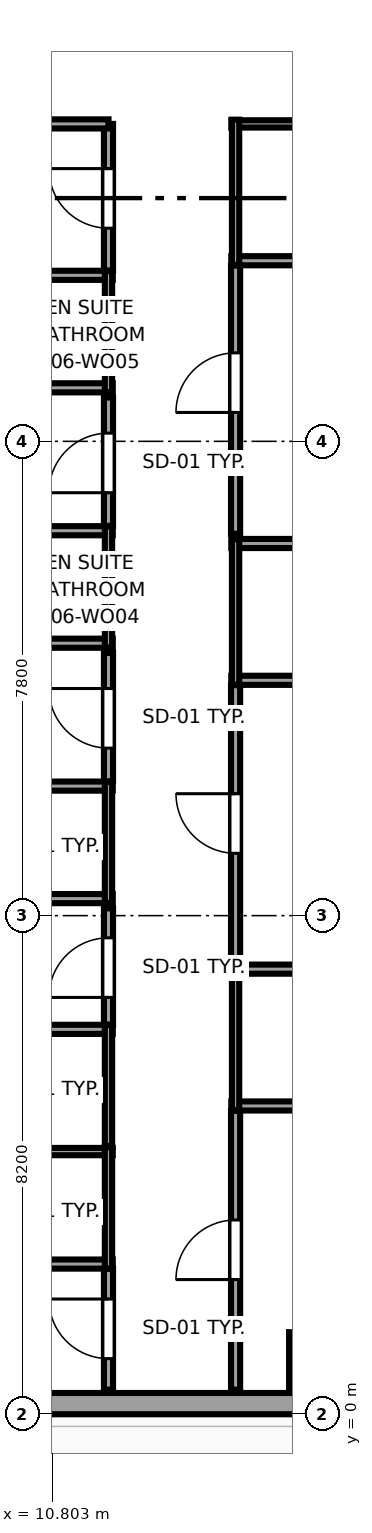
"""IFC4 building model, lengths in metres.
Left out: names, types, materials, properties, quantities, classifications, styles, units other than length and angle.
Written with IfcOpenShell. Run it as: python <this file> out.ifc"""

import sys

from ifc_helpers import new_model, si_unit, direction, frame, frame_2d, origin, origin_2d, place, context, subcontext, project, spatial, rectangle, extrude, source, transform, mapped, element, fill, save


model = new_model("IFC4")
c1 = context("Model", 3, precision=1e-05, world=origin(), true_north=direction((0.0, 1.0)))
c2 = subcontext(c1, "Body", "Model", "MODEL_VIEW")
j1 = project(units=[si_unit("LENGTHUNIT", "METRE"), si_unit("PLANEANGLEUNIT", "RADIAN")], contexts=[c1])
p1 = place(None, origin())
s1 = spatial("IfcSite", under=j1, at=p1, CompositionType="ELEMENT")
p2 = place(p1, origin())
s2 = spatial("IfcBuilding", under=s1, at=p2, CompositionType="ELEMENT")
p3 = place(p2, frame((0.0, 0.0, 32.0)))
s3 = spatial("IfcBuildingStorey", under=s2, at=p3, CompositionType="ELEMENT", Elevation=32.0)
m1 = source(origin(), c2, "Body", "SweptSolid", [
    extrude(rectangle(XDim=1.0, YDim=1.0, at=origin_2d()), origin(), (0.0, 0.0, 1.0), 3.55),
])
p4 = place(p3, frame((15.2, 0.85, 0.0), z_axis=(0.0, 0.0, 1.0), x_axis=(1.0, 0.0, 0.0)))
e1 = element("IfcColumn", 1, at=p4, inside=s3, PredefinedType="COLUMN", context=c2, shape_type="MappedRepresentation", body=[
    mapped(m1, transform((0.0, 0.0, 0.0), x_axis=(1.0, 0.0, 0.0), y_axis=(0.0, 1.0, 0.0), z_axis=(0.0, 0.0, 1.0), scale=1.0)),
])
p5 = place(p3, frame((4.617, 0.175, 0.0), z_axis=(0.0, 0.0, 1.0), x_axis=(1.0, 0.0, 0.0)))
e2 = element("IfcWall", 2, at=p5, inside=s3, PredefinedType="SOLIDWALL", context=c2, shape_type="SweptSolid", body=[
    extrude(rectangle(XDim=18.008, YDim=0.35, at=frame_2d((9.004, 0.0))), origin(), (0.0, 0.0, 1.0), 3.37),
])
p6 = place(p5, frame((14.257, 0.0, 0.68)))
e3 = element("IfcOpeningElement", 3, at=p6, cuts=e2, PredefinedType="OPENING", context=c2, shape_type="SweptSolid", body=[
    extrude(rectangle(XDim=2.1, YDim=1.9, at=frame_2d((1.05, 0.95))), frame((0.0, 0.185, 0.0), z_axis=(0.0, -1.0, 0.0), x_axis=(1.0, 0.0, 0.0)), (0.0, 0.0, 1.0), 0.37),
])
p7 = place(p5, frame((3.7, 0.0, 0.62)))
e4 = element("IfcOpeningElement", 4, at=p7, cuts=e2, PredefinedType="OPENING", context=c2, shape_type="SweptSolid", body=[
    extrude(rectangle(XDim=1.5, YDim=1.55, at=frame_2d((0.75, 0.775))), frame((0.0, 0.185, 0.0), z_axis=(0.0, -1.0, 0.0), x_axis=(1.0, 0.0, 0.0)), (0.0, 0.0, 1.0), 0.37),
])
p8 = place(p3, frame((9.21, 2.47, 0.0), z_axis=(0.0, 0.0, 1.0), x_axis=(1.0, 0.0, 0.0)))
e5 = element("IfcWall", 5, at=p8, inside=s3, PredefinedType="PARTITIONING", context=c2, shape_type="SweptSolid", body=[
    extrude(rectangle(XDim=2.59, YDim=0.15, at=frame_2d((1.295, 0.0))), origin(), (0.0, 0.0, 1.0), 3.37),
])
p9 = place(p3, frame((9.21, 4.32, 0.0), z_axis=(0.0, 0.0, 1.0), x_axis=(1.0, 0.0, 0.0)))
e6 = element("IfcWall", 6, at=p9, inside=s3, PredefinedType="PLUMBINGWALL", context=c2, shape_type="SweptSolid", body=[
    extrude(rectangle(XDim=2.59, YDim=0.12, at=frame_2d((1.295, 0.0))), origin(), (0.0, 0.0, 1.0), 3.37),
])
p10 = place(p3, frame((11.73, 2.4, 0.0), z_axis=(0.0, 0.0, 1.0), x_axis=(0.0, 1.0, 0.0)))
e7 = element("IfcWall", 7, at=p10, inside=s3, PredefinedType="PLUMBINGWALL", context=c2, shape_type="SweptSolid", body=[
    extrude(rectangle(XDim=1.99, YDim=0.12, at=frame_2d((0.995, 0.0))), origin(), (0.0, 0.0, 1.0), 3.37),
])
p11 = place(p3, frame((9.21, 6.33, 0.0), z_axis=(0.0, 0.0, 1.0), x_axis=(1.0, 0.0, 0.0)))
e8 = element("IfcWall", 8, at=p11, inside=s3, PredefinedType="PARTITIONING", context=c2, shape_type="SweptSolid", body=[
    extrude(rectangle(XDim=2.59, YDim=0.15, at=frame_2d((1.295, 0.0))), origin(), (0.0, 0.0, 1.0), 3.37),
])
p12 = place(p3, frame((11.73, 4.41, 0.0), z_axis=(0.0, 0.0, 1.0), x_axis=(0.0, 1.0, 0.0)))
e9 = element("IfcWall", 9, at=p12, inside=s3, PredefinedType="PLUMBINGWALL", context=c2, shape_type="SweptSolid", body=[
    extrude(rectangle(XDim=1.99, YDim=0.12, at=frame_2d((0.995, 0.0))), origin(), (0.0, 0.0, 1.0), 3.37),
])
p13 = place(p3, frame((0.405, 8.48, 0.0), z_axis=(0.0, 0.0, 1.0), x_axis=(1.0, 0.0, 0.0)))
e10 = element("IfcWall", 10, at=p13, inside=s3, PredefinedType="PARTITIONING", context=c2, shape_type="SweptSolid", body=[
    extrude(rectangle(XDim=11.395, YDim=0.15, at=frame_2d((5.698, 0.0))), origin(), (0.0, 0.0, 1.0), 3.37),
])
p14 = place(p3, frame((9.21, 10.33, 0.0), z_axis=(0.0, 0.0, 1.0), x_axis=(1.0, 0.0, 0.0)))
e11 = element("IfcWall", 11, at=p14, inside=s3, PredefinedType="PARTITIONING", context=c2, shape_type="SweptSolid", body=[
    extrude(rectangle(XDim=2.59, YDim=0.15, at=frame_2d((1.295, 0.0))), origin(), (0.0, 0.0, 1.0), 3.37),
])
p15 = place(p3, frame((11.73, 8.41, 0.0), z_axis=(0.0, 0.0, 1.0), x_axis=(0.0, 1.0, 0.0)))
e12 = element("IfcWall", 12, at=p15, inside=s3, PredefinedType="PLUMBINGWALL", context=c2, shape_type="SweptSolid", body=[
    extrude(rectangle(XDim=1.99, YDim=0.12, at=frame_2d((0.995, 0.0))), origin(), (0.0, 0.0, 1.0), 3.37),
])
p16 = place(p3, frame((0.405, 12.68, 0.0), z_axis=(0.0, 0.0, 1.0), x_axis=(1.0, 0.0, 0.0)))
e13 = element("IfcWall", 13, at=p16, inside=s3, PredefinedType="PARTITIONING", context=c2, shape_type="SweptSolid", body=[
    extrude(rectangle(XDim=11.395, YDim=0.15, at=frame_2d((5.698, 0.0))), origin(), (0.0, 0.0, 1.0), 3.37),
])
p17 = place(p3, frame((9.21, 14.53, 0.0), z_axis=(0.0, 0.0, 1.0), x_axis=(1.0, 0.0, 0.0)))
e14 = element("IfcWall", 14, at=p17, inside=s3, PredefinedType="PARTITIONING", context=c2, shape_type="SweptSolid", body=[
    extrude(rectangle(XDim=2.59, YDim=0.15, at=frame_2d((1.295, 0.0))), origin(), (0.0, 0.0, 1.0), 3.37),
])
p18 = place(p3, frame((11.73, 12.61, 0.0), z_axis=(0.0, 0.0, 1.0), x_axis=(0.0, 1.0, 0.0)))
e15 = element("IfcWall", 15, at=p18, inside=s3, PredefinedType="PLUMBINGWALL", context=c2, shape_type="SweptSolid", body=[
    extrude(rectangle(XDim=1.99, YDim=0.12, at=frame_2d((0.995, 0.0))), origin(), (0.0, 0.0, 1.0), 3.37),
])
p19 = place(p3, frame((0.405, 16.88, 0.0), z_axis=(0.0, 0.0, 1.0), x_axis=(1.0, 0.0, 0.0)))
e16 = element("IfcWall", 16, at=p19, inside=s3, PredefinedType="PARTITIONING", context=c2, shape_type="SweptSolid", body=[
    extrude(rectangle(XDim=11.395, YDim=0.15, at=frame_2d((5.698, 0.0))), origin(), (0.0, 0.0, 1.0), 3.37),
])
p20 = place(p3, frame((9.21, 18.73, 0.0), z_axis=(0.0, 0.0, 1.0), x_axis=(1.0, 0.0, 0.0)))
e17 = element("IfcWall", 17, at=p20, inside=s3, PredefinedType="PARTITIONING", context=c2, shape_type="SweptSolid", body=[
    extrude(rectangle(XDim=2.59, YDim=0.15, at=frame_2d((1.295, 0.0))), origin(), (0.0, 0.0, 1.0), 3.37),
])
p21 = place(p3, frame((11.73, 16.81, 0.0), z_axis=(0.0, 0.0, 1.0), x_axis=(0.0, 1.0, 0.0)))
e18 = element("IfcWall", 18, at=p21, inside=s3, PredefinedType="PLUMBINGWALL", context=c2, shape_type="SweptSolid", body=[
    extrude(rectangle(XDim=1.99, YDim=0.12, at=frame_2d((0.995, 0.0))), origin(), (0.0, 0.0, 1.0), 3.37),
])
for number, where, z_axis, x_axis in (
    (19, (13.75, 5.07, 0.0), (0.0, 0.0, 1.0), (1.0, 0.0, 0.0)),
    (20, (13.75, 7.32, 0.0), (0.0, 0.0, 1.0), (1.0, 0.0, 0.0)),
):
    element("IfcWall", number, at=place(p3, frame(where, z_axis=z_axis, x_axis=x_axis)), inside=s3, PredefinedType="PARTITIONING", context=c2, shape_type="SweptSolid", body=[
        extrude(rectangle(XDim=2.59, YDim=0.15, at=frame_2d((1.295, 0.0))), origin(), (0.0, 0.0, 1.0), 3.37),
    ])
p22 = place(p3, frame((13.82, 5.0, 0.0), z_axis=(0.0, 0.0, 1.0), x_axis=(0.0, 1.0, 0.0)))
e21 = element("IfcWall", 21, at=p22, inside=s3, PredefinedType="PLUMBINGWALL", context=c2, shape_type="SweptSolid", body=[
    extrude(rectangle(XDim=2.39, YDim=0.12, at=frame_2d((1.195, 0.0))), origin(), (0.0, 0.0, 1.0), 3.37),
])
for number, where, z_axis, x_axis in (
    (22, (13.75, 12.07, 0.0), (0.0, 0.0, 1.0), (1.0, 0.0, 0.0)),
    (23, (13.75, 14.32, 0.0), (0.0, 0.0, 1.0), (1.0, 0.0, 0.0)),
):
    element("IfcWall", number, at=place(p3, frame(where, z_axis=z_axis, x_axis=x_axis)), inside=s3, PredefinedType="PARTITIONING", context=c2, shape_type="SweptSolid", body=[
        extrude(rectangle(XDim=2.59, YDim=0.15, at=frame_2d((1.295, 0.0))), origin(), (0.0, 0.0, 1.0), 3.37),
    ])
p23 = place(p3, frame((13.82, 12.0, 0.0), z_axis=(0.0, 0.0, 1.0), x_axis=(0.0, 1.0, 0.0)))
e24 = element("IfcWall", 24, at=p23, inside=s3, PredefinedType="PLUMBINGWALL", context=c2, shape_type="SweptSolid", body=[
    extrude(rectangle(XDim=2.39, YDim=0.12, at=frame_2d((1.195, 0.0))), origin(), (0.0, 0.0, 1.0), 3.37),
])
p24 = place(p3, frame((13.75, 18.97, 0.0), z_axis=(0.0, 0.0, 1.0), x_axis=(1.0, 0.0, 0.0)))
e25 = element("IfcWall", 25, at=p24, inside=s3, PredefinedType="PARTITIONING", context=c2, shape_type="SweptSolid", body=[
    extrude(rectangle(XDim=2.59, YDim=0.15, at=frame_2d((1.295, 0.0))), origin(), (0.0, 0.0, 1.0), 3.37),
])
p25 = place(p3, frame((13.75, 21.22, 0.0), z_axis=(0.0, 0.0, 1.0), x_axis=(1.0, 0.0, 0.0)))
e26 = element("IfcWall", 26, at=p25, inside=s3, PredefinedType="PLUMBINGWALL", context=c2, shape_type="SweptSolid", body=[
    extrude(rectangle(XDim=2.59, YDim=0.12, at=frame_2d((1.295, 0.0))), origin(), (0.0, 0.0, 1.0), 3.37),
])
p26 = place(p3, frame((13.82, 18.9, 0.0), z_axis=(0.0, 0.0, 1.0), x_axis=(0.0, 1.0, 0.0)))
e27 = element("IfcWall", 27, at=p26, inside=s3, PredefinedType="PLUMBINGWALL", context=c2, shape_type="SweptSolid", body=[
    extrude(rectangle(XDim=2.39, YDim=0.12, at=frame_2d((1.195, 0.0))), origin(), (0.0, 0.0, 1.0), 3.37),
])
p27 = place(p3, frame((11.73, 0.405, 0.0), z_axis=(0.0, 0.0, 1.0), x_axis=(0.0, 1.0, 0.0)))
e28 = element("IfcWall", 28, at=p27, inside=s3, PredefinedType="PARTITIONING", context=c2, shape_type="SweptSolid", body=[
    extrude(rectangle(XDim=1.985, YDim=0.15, at=frame_2d((0.992, 0.0))), origin(), (0.0, 0.0, 1.0), 3.37),
])
p28 = place(p27, frame((0.51, 0.0, 0.0)))
e29 = element("IfcOpeningElement", 29, at=p28, cuts=e28, PredefinedType="OPENING", context=c2, shape_type="SweptSolid", body=[
    extrude(rectangle(XDim=0.98, YDim=2.12, at=frame_2d((0.49, 1.06))), frame((0.0, 0.085, 0.0), z_axis=(0.0, -1.0, 0.0), x_axis=(1.0, 0.0, 0.0)), (0.0, 0.0, 1.0), 0.17),
])
p29 = place(p3, frame((11.73, 6.41, 0.0), z_axis=(0.0, 0.0, 1.0), x_axis=(0.0, 1.0, 0.0)))
e30 = element("IfcWall", 30, at=p29, inside=s3, PredefinedType="PARTITIONING", context=c2, shape_type="SweptSolid", body=[
    extrude(rectangle(XDim=1.91, YDim=0.15, at=frame_2d((0.955, 0.0))), origin(), (0.0, 0.0, 1.0), 3.37),
])
p30 = place(p29, frame((0.445, 0.0, 0.0)))
e31 = element("IfcOpeningElement", 31, at=p30, cuts=e30, PredefinedType="OPENING", context=c2, shape_type="SweptSolid", body=[
    extrude(rectangle(XDim=0.98, YDim=2.12, at=frame_2d((0.49, 1.06))), frame((0.0, 0.085, 0.0), z_axis=(0.0, -1.0, 0.0), x_axis=(1.0, 0.0, 0.0)), (0.0, 0.0, 1.0), 0.17),
])
p31 = place(p3, frame((11.73, 10.41, 0.0), z_axis=(0.0, 0.0, 1.0), x_axis=(0.0, 1.0, 0.0)))
e32 = element("IfcWall", 32, at=p31, inside=s3, PredefinedType="PARTITIONING", context=c2, shape_type="SweptSolid", body=[
    extrude(rectangle(XDim=2.11, YDim=0.15, at=frame_2d((1.055, 0.0))), origin(), (0.0, 0.0, 1.0), 3.37),
])
p32 = place(p31, frame((0.545, 0.0, 0.0)))
e33 = element("IfcOpeningElement", 33, at=p32, cuts=e32, PredefinedType="OPENING", context=c2, shape_type="SweptSolid", body=[
    extrude(rectangle(XDim=0.98, YDim=2.12, at=frame_2d((0.49, 1.06))), frame((0.0, 0.085, 0.0), z_axis=(0.0, -1.0, 0.0), x_axis=(1.0, 0.0, 0.0)), (0.0, 0.0, 1.0), 0.17),
])
p33 = place(p3, frame((11.73, 14.61, 0.0), z_axis=(0.0, 0.0, 1.0), x_axis=(0.0, 1.0, 0.0)))
e34 = element("IfcWall", 34, at=p33, inside=s3, PredefinedType="PARTITIONING", context=c2, shape_type="SweptSolid", body=[
    extrude(rectangle(XDim=2.11, YDim=0.15, at=frame_2d((1.055, 0.0))), origin(), (0.0, 0.0, 1.0), 3.37),
])
p34 = place(p33, frame((0.545, 0.0, 0.0)))
e35 = element("IfcOpeningElement", 35, at=p34, cuts=e34, PredefinedType="OPENING", context=c2, shape_type="SweptSolid", body=[
    extrude(rectangle(XDim=0.98, YDim=2.12, at=frame_2d((0.49, 1.06))), frame((0.0, 0.085, 0.0), z_axis=(0.0, -1.0, 0.0), x_axis=(1.0, 0.0, 0.0)), (0.0, 0.0, 1.0), 0.17),
])
p35 = place(p3, frame((11.73, 18.81, 0.0), z_axis=(0.0, 0.0, 1.0), x_axis=(0.0, 1.0, 0.0)))
e36 = element("IfcWall", 36, at=p35, inside=s3, PredefinedType="PARTITIONING", context=c2, shape_type="SweptSolid", body=[
    extrude(rectangle(XDim=2.41, YDim=0.15, at=frame_2d((1.205, 0.0))), origin(), (0.0, 0.0, 1.0), 3.37),
])
p36 = place(p35, frame((0.695, 0.0, 0.0)))
e37 = element("IfcOpeningElement", 37, at=p36, cuts=e36, PredefinedType="OPENING", context=c2, shape_type="SweptSolid", body=[
    extrude(rectangle(XDim=0.98, YDim=2.12, at=frame_2d((0.49, 1.06))), frame((0.0, 0.085, 0.0), z_axis=(0.0, -1.0, 0.0), x_axis=(1.0, 0.0, 0.0)), (0.0, 0.0, 1.0), 0.17),
])
p37 = place(p3, frame((0.405, 21.22, 0.0), z_axis=(0.0, 0.0, 1.0), x_axis=(1.0, 0.0, 0.0)))
e38 = element("IfcWall", 38, at=p37, inside=s3, PredefinedType="PARTITIONING", context=c2, shape_type="SweptSolid", body=[
    extrude(rectangle(XDim=11.325, YDim=0.15, at=frame_2d((5.663, 0.0))), origin(), (0.0, 0.0, 1.0), 3.37),
])
p38 = place(p3, frame((13.82, 0.405, 0.0), z_axis=(0.0, 0.0, 1.0), x_axis=(0.0, 1.0, 0.0)))
e39 = element("IfcWall", 39, at=p38, inside=s3, PredefinedType="PARTITIONING", context=c2, shape_type="SweptSolid", body=[
    extrude(rectangle(XDim=4.585, YDim=0.15, at=frame_2d((2.292, 0.0))), origin(), (0.0, 0.0, 1.0), 3.37),
])
p39 = place(p38, frame((1.81, 0.0, 0.0)))
e40 = element("IfcOpeningElement", 40, at=p39, cuts=e39, PredefinedType="OPENING", context=c2, shape_type="SweptSolid", body=[
    extrude(rectangle(XDim=0.98, YDim=2.12, at=frame_2d((0.49, 1.06))), frame((0.0, 0.085, 0.0), z_axis=(0.0, -1.0, 0.0), x_axis=(1.0, 0.0, 0.0)), (0.0, 0.0, 1.0), 0.17),
])
p40 = place(p3, frame((13.82, 7.48, 0.0), z_axis=(0.0, 0.0, 1.0), x_axis=(0.0, 1.0, 0.0)))
e41 = element("IfcWall", 41, at=p40, inside=s3, PredefinedType="PARTITIONING", context=c2, shape_type="SweptSolid", body=[
    extrude(rectangle(XDim=4.51, YDim=0.15, at=frame_2d((2.255, 0.0))), origin(), (0.0, 0.0, 1.0), 3.37),
])
p41 = place(p40, frame((1.745, 0.0, 0.0)))
e42 = element("IfcOpeningElement", 42, at=p41, cuts=e41, PredefinedType="OPENING", context=c2, shape_type="SweptSolid", body=[
    extrude(rectangle(XDim=0.98, YDim=2.12, at=frame_2d((0.49, 1.06))), frame((0.0, 0.085, 0.0), z_axis=(0.0, -1.0, 0.0), x_axis=(1.0, 0.0, 0.0)), (0.0, 0.0, 1.0), 0.17),
])
p42 = place(p3, frame((13.82, 14.48, 0.0), z_axis=(0.0, 0.0, 1.0), x_axis=(0.0, 1.0, 0.0)))
e43 = element("IfcWall", 43, at=p42, inside=s3, PredefinedType="PARTITIONING", context=c2, shape_type="SweptSolid", body=[
    extrude(rectangle(XDim=4.41, YDim=0.15, at=frame_2d((2.205, 0.0))), origin(), (0.0, 0.0, 1.0), 3.37),
])
p43 = place(p42, frame((1.995, 0.0, 0.0)))
e44 = element("IfcOpeningElement", 44, at=p43, cuts=e43, PredefinedType="OPENING", context=c2, shape_type="SweptSolid", body=[
    extrude(rectangle(XDim=0.98, YDim=2.12, at=frame_2d((0.49, 1.06))), frame((0.0, 0.085, 0.0), z_axis=(0.0, -1.0, 0.0), x_axis=(1.0, 0.0, 0.0)), (0.0, 0.0, 1.0), 0.17),
])
m2 = source(origin(), c2, "Body", "SweptSolid", [
    extrude(rectangle(XDim=0.98, YDim=2.12, at=frame_2d((0.49, 1.06))), frame((0.0, 0.025, 0.0), z_axis=(0.0, -1.0, 0.0), x_axis=(1.0, 0.0, 0.0)), (0.0, 0.0, 1.0), 0.05),
])
p44 = place(p28, origin())
e45 = element("IfcDoor", 45, at=p44, inside=s3, OperationType="SINGLE_SWING_RIGHT", PredefinedType="DOOR", context=c2, shape_type="MappedRepresentation", body=[
    mapped(m2, transform((0.0, 0.0, 0.0), x_axis=(1.0, 0.0, 0.0), y_axis=(0.0, 1.0, 0.0), z_axis=(0.0, 0.0, 1.0), scale=1.0)),
])
fill(e29, e45)
p45 = place(p30, origin())
e46 = element("IfcDoor", 46, at=p45, inside=s3, OperationType="SINGLE_SWING_LEFT", PredefinedType="DOOR", context=c2, shape_type="MappedRepresentation", body=[
    mapped(m2, transform((0.0, 0.0, 0.0), x_axis=(1.0, 0.0, 0.0), y_axis=(0.0, 1.0, 0.0), z_axis=(0.0, 0.0, 1.0), scale=1.0)),
])
fill(e31, e46)
p46 = place(p32, origin())
e47 = element("IfcDoor", 47, at=p46, inside=s3, OperationType="SINGLE_SWING_RIGHT", PredefinedType="DOOR", context=c2, shape_type="MappedRepresentation", body=[
    mapped(m2, transform((0.0, 0.0, 0.0), x_axis=(1.0, 0.0, 0.0), y_axis=(0.0, 1.0, 0.0), z_axis=(0.0, 0.0, 1.0), scale=1.0)),
])
fill(e33, e47)
p47 = place(p34, origin())
e48 = element("IfcDoor", 48, at=p47, inside=s3, OperationType="SINGLE_SWING_LEFT", PredefinedType="DOOR", context=c2, shape_type="MappedRepresentation", body=[
    mapped(m2, transform((0.0, 0.0, 0.0), x_axis=(1.0, 0.0, 0.0), y_axis=(0.0, 1.0, 0.0), z_axis=(0.0, 0.0, 1.0), scale=1.0)),
])
fill(e35, e48)
p48 = place(p36, origin())
e49 = element("IfcDoor", 49, at=p48, inside=s3, OperationType="SINGLE_SWING_RIGHT", PredefinedType="DOOR", context=c2, shape_type="MappedRepresentation", body=[
    mapped(m2, transform((0.0, 0.0, 0.0), x_axis=(1.0, 0.0, 0.0), y_axis=(0.0, 1.0, 0.0), z_axis=(0.0, 0.0, 1.0), scale=1.0)),
])
fill(e37, e49)
p49 = place(p39, origin())
e50 = element("IfcDoor", 50, at=p49, inside=s3, OperationType="SINGLE_SWING_LEFT", PredefinedType="DOOR", context=c2, shape_type="MappedRepresentation", body=[
    mapped(m2, transform((0.0, 0.0, 0.0), x_axis=(1.0, 0.0, 0.0), y_axis=(0.0, 1.0, 0.0), z_axis=(0.0, 0.0, 1.0), scale=1.0)),
])
fill(e40, e50)
p50 = place(p41, origin())
e51 = element("IfcDoor", 51, at=p50, inside=s3, OperationType="SINGLE_SWING_RIGHT", PredefinedType="DOOR", context=c2, shape_type="MappedRepresentation", body=[
    mapped(m2, transform((0.0, 0.0, 0.0), x_axis=(1.0, 0.0, 0.0), y_axis=(0.0, 1.0, 0.0), z_axis=(0.0, 0.0, 1.0), scale=1.0)),
])
fill(e42, e51)
p51 = place(p43, origin())
e52 = element("IfcDoor", 52, at=p51, inside=s3, OperationType="SINGLE_SWING_LEFT", PredefinedType="DOOR", context=c2, shape_type="MappedRepresentation", body=[
    mapped(m2, transform((0.0, 0.0, 0.0), x_axis=(1.0, 0.0, 0.0), y_axis=(0.0, 1.0, 0.0), z_axis=(0.0, 0.0, 1.0), scale=1.0)),
])
fill(e44, e52)
save(model, sys.argv[1])
